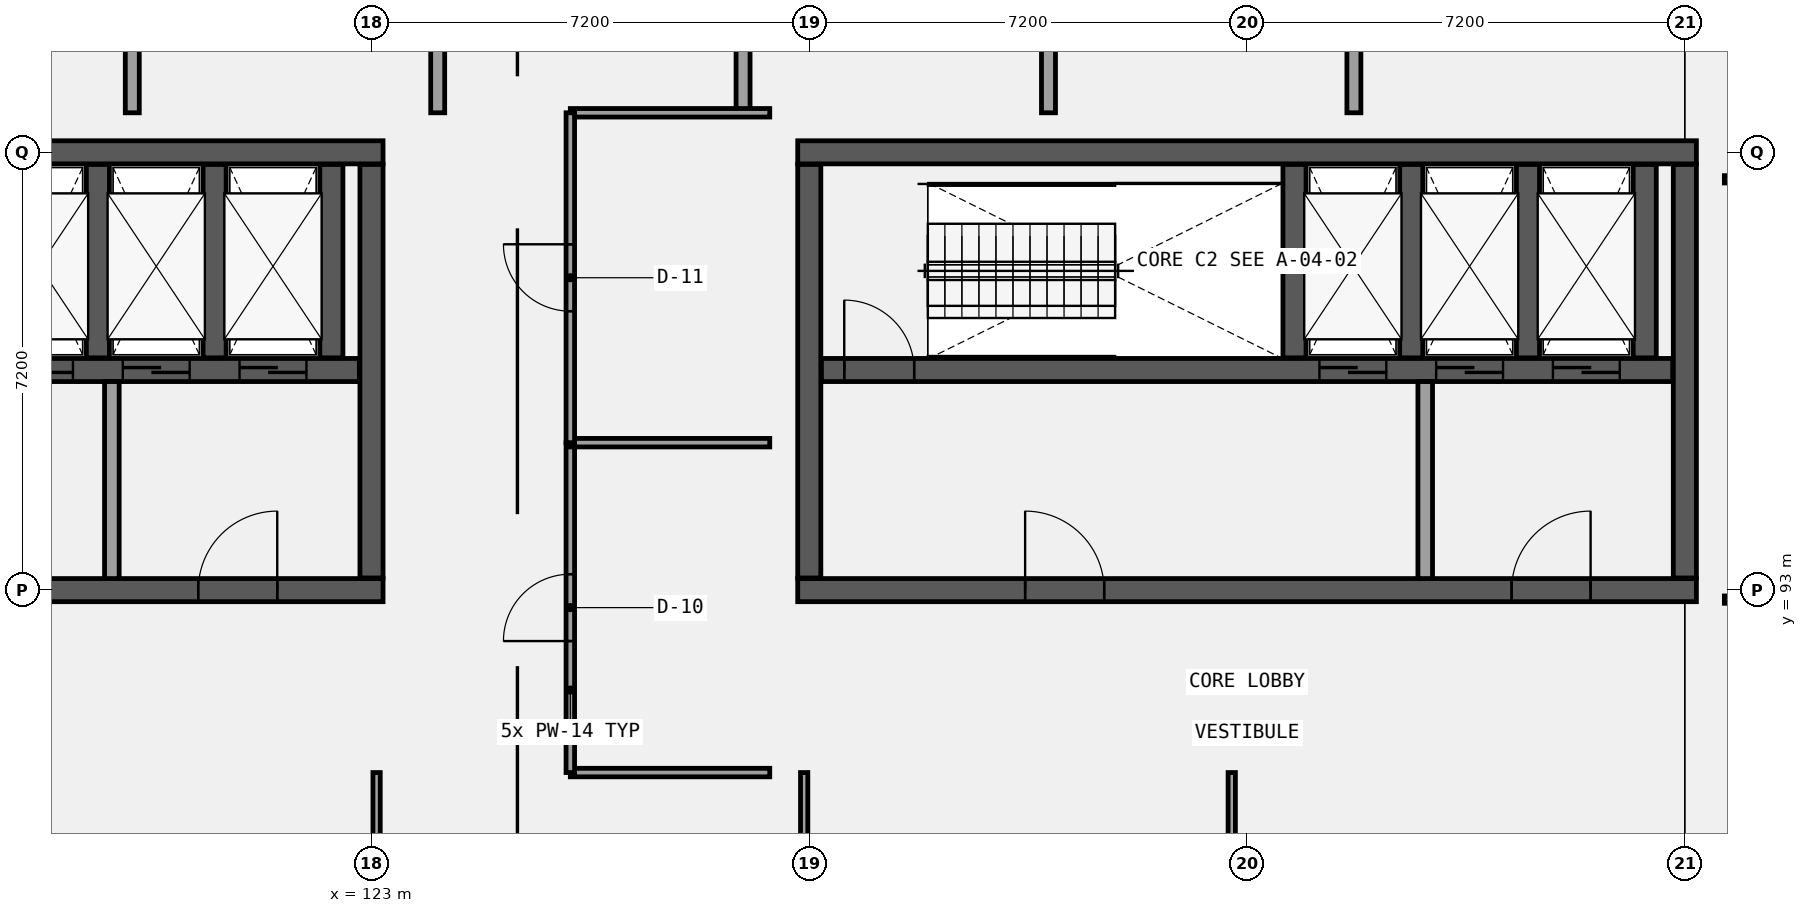
"""IFC4 building model, lengths in metres.
Left out: names, types, materials, properties, quantities, classifications, styles, units other than length and angle.
Written with IfcOpenShell. Run it as: python <this file> out.ifc"""

import sys

from ifc_helpers import new_model, si_unit, direction, frame, frame_2d, origin, place, context, subcontext, project, spatial, rectangle, extrude, element, fill, save


model = new_model("IFC4")
c1 = context("Model", 3, precision=1e-05, world=origin(), true_north=direction((0.0, 1.0)))
c2 = subcontext(c1, "Body", "Model", "MODEL_VIEW")
j1 = project(units=[si_unit("LENGTHUNIT", "METRE"), si_unit("PLANEANGLEUNIT", "RADIAN")], contexts=[c1])
p1 = place(None, origin())
s1 = spatial("IfcSite", under=j1, at=p1, CompositionType="ELEMENT")
p2 = place(p1, origin())
s2 = spatial("IfcBuilding", under=s1, at=p2, CompositionType="ELEMENT")
p3 = place(p2, frame((0.0, 0.0, 13.8)))
s3 = spatial("IfcBuildingStorey", under=s2, at=p3, CompositionType="ELEMENT", Elevation=13.8)
p4 = place(p3, frame((108.41, 100.2, 0.0), z_axis=(0.0, 0.0, 1.0), x_axis=(1.0, 0.0, 0.0)))
e1 = element("IfcWall", 1, at=p4, inside=s3, PredefinedType="SHEAR", context=c2, shape_type="SweptSolid", body=[
    extrude(rectangle(XDim=14.78, YDim=0.38, at=frame_2d((7.39, 0.0))), origin(), (0.0, 0.0, 1.0), 4.2),
])
p5 = place(p3, frame((108.41, 93.0, 0.0), z_axis=(0.0, 0.0, 1.0), x_axis=(1.0, 0.0, 0.0)))
e2 = element("IfcWall", 2, at=p5, inside=s3, PredefinedType="SHEAR", context=c2, shape_type="SweptSolid", body=[
    extrude(rectangle(XDim=14.78, YDim=0.38, at=frame_2d((7.39, 0.0))), origin(), (0.0, 0.0, 1.0), 4.2),
])
p6 = place(p5, frame((3.74, 0.0, 0.0)))
e3 = element("IfcOpeningElement", 3, at=p6, cuts=e2, PredefinedType="OPENING", context=c2, shape_type="SweptSolid", body=[
    extrude(rectangle(XDim=1.3, YDim=2.2, at=frame_2d((0.65, 1.1))), frame((0.0, 0.2, 0.0), z_axis=(0.0, -1.0, 0.0), x_axis=(1.0, 0.0, 0.0)), (0.0, 0.0, 1.0), 0.4),
])
p7 = place(p5, frame((11.74, 0.0, 0.0)))
e4 = element("IfcOpeningElement", 4, at=p7, cuts=e2, PredefinedType="OPENING", context=c2, shape_type="SweptSolid", body=[
    extrude(rectangle(XDim=1.3, YDim=2.2, at=frame_2d((0.65, 1.1))), frame((0.0, 0.2, 0.0), z_axis=(0.0, -1.0, 0.0), x_axis=(1.0, 0.0, 0.0)), (0.0, 0.0, 1.0), 0.4),
])
p8 = place(p3, frame((123.0, 93.2, 0.0), z_axis=(0.0, 0.0, 1.0), x_axis=(0.0, 1.0, 0.0)))
e5 = element("IfcWall", 5, at=p8, inside=s3, PredefinedType="SHEAR", context=c2, shape_type="SweptSolid", body=[
    extrude(rectangle(XDim=6.8, YDim=0.38, at=frame_2d((3.4, 0.0))), origin(), (0.0, 0.0, 1.0), 4.2),
])
p9 = place(p3, frame((108.8, 96.62, 0.0), z_axis=(0.0, 0.0, 1.0), x_axis=(1.0, 0.0, 0.0)))
e6 = element("IfcWall", 6, at=p9, inside=s3, PredefinedType="SHEAR", context=c2, shape_type="SweptSolid", body=[
    extrude(rectangle(XDim=14.0, YDim=0.38, at=frame_2d((7.0, 0.0))), origin(), (0.0, 0.0, 1.0), 4.2),
])
p10 = place(p9, frame((8.19, 0.0, 0.0)))
e7 = element("IfcOpeningElement", 7, at=p10, cuts=e6, PredefinedType="OPENING", context=c2, shape_type="SweptSolid", body=[
    extrude(rectangle(XDim=1.1, YDim=2.15, at=frame_2d((0.55, 1.075))), frame((0.0, 0.2, 0.0), z_axis=(0.0, -1.0, 0.0), x_axis=(1.0, 0.0, 0.0)), (0.0, 0.0, 1.0), 0.4),
])
p11 = place(p9, frame((10.11, 0.0, 0.0)))
e8 = element("IfcOpeningElement", 8, at=p11, cuts=e6, PredefinedType="OPENING", context=c2, shape_type="SweptSolid", body=[
    extrude(rectangle(XDim=1.1, YDim=2.15, at=frame_2d((0.55, 1.075))), frame((0.0, 0.2, 0.0), z_axis=(0.0, -1.0, 0.0), x_axis=(1.0, 0.0, 0.0)), (0.0, 0.0, 1.0), 0.4),
])
p12 = place(p9, frame((12.03, 0.0, 0.0)))
e9 = element("IfcOpeningElement", 9, at=p12, cuts=e6, PredefinedType="OPENING", context=c2, shape_type="SweptSolid", body=[
    extrude(rectangle(XDim=1.1, YDim=2.15, at=frame_2d((0.55, 1.075))), frame((0.0, 0.2, 0.0), z_axis=(0.0, -1.0, 0.0), x_axis=(1.0, 0.0, 0.0)), (0.0, 0.0, 1.0), 0.4),
])
p13 = place(p9, frame((0.375, 0.0, 0.0)))
e10 = element("IfcOpeningElement", 10, at=p13, cuts=e6, PredefinedType="OPENING", context=c2, shape_type="SweptSolid", body=[
    extrude(rectangle(XDim=1.15, YDim=2.15, at=frame_2d((0.575, 1.075))), frame((0.0, 0.2, 0.0), z_axis=(0.0, -1.0, 0.0), x_axis=(1.0, 0.0, 0.0)), (0.0, 0.0, 1.0), 0.4),
])
for number, where, z_axis, x_axis in (
    (11, (118.5, 96.82, 0.0), (0.0, 0.0, 1.0), (0.0, 1.0, 0.0)),
    (12, (120.42, 96.82, 0.0), (0.0, 0.0, 1.0), (0.0, 1.0, 0.0)),
    (13, (122.34, 96.82, 0.0), (0.0, 0.0, 1.0), (0.0, 1.0, 0.0)),
):
    element("IfcWall", number, at=place(p3, frame(where, z_axis=z_axis, x_axis=x_axis)), inside=s3, PredefinedType="SHEAR", context=c2, shape_type="SweptSolid", body=[
        extrude(rectangle(XDim=3.18, YDim=0.38, at=frame_2d((1.59, 0.0))), origin(), (0.0, 0.0, 1.0), 4.2),
    ])
p14 = place(p3, frame((130.01, 100.2, 0.0), z_axis=(0.0, 0.0, 1.0), x_axis=(1.0, 0.0, 0.0)))
e14 = element("IfcWall", 14, at=p14, inside=s3, PredefinedType="SHEAR", context=c2, shape_type="SweptSolid", body=[
    extrude(rectangle(XDim=14.78, YDim=0.38, at=frame_2d((7.39, 0.0))), origin(), (0.0, 0.0, 1.0), 4.2),
])
p15 = place(p3, frame((130.01, 93.0, 0.0), z_axis=(0.0, 0.0, 1.0), x_axis=(1.0, 0.0, 0.0)))
e15 = element("IfcWall", 15, at=p15, inside=s3, PredefinedType="SHEAR", context=c2, shape_type="SweptSolid", body=[
    extrude(rectangle(XDim=14.78, YDim=0.38, at=frame_2d((7.39, 0.0))), origin(), (0.0, 0.0, 1.0), 4.2),
])
p16 = place(p15, frame((3.74, 0.0, 0.0)))
e16 = element("IfcOpeningElement", 16, at=p16, cuts=e15, PredefinedType="OPENING", context=c2, shape_type="SweptSolid", body=[
    extrude(rectangle(XDim=1.3, YDim=2.2, at=frame_2d((0.65, 1.1))), frame((0.0, 0.2, 0.0), z_axis=(0.0, -1.0, 0.0), x_axis=(1.0, 0.0, 0.0)), (0.0, 0.0, 1.0), 0.4),
])
p17 = place(p15, frame((11.74, 0.0, 0.0)))
e17 = element("IfcOpeningElement", 17, at=p17, cuts=e15, PredefinedType="OPENING", context=c2, shape_type="SweptSolid", body=[
    extrude(rectangle(XDim=1.3, YDim=2.2, at=frame_2d((0.65, 1.1))), frame((0.0, 0.2, 0.0), z_axis=(0.0, -1.0, 0.0), x_axis=(1.0, 0.0, 0.0)), (0.0, 0.0, 1.0), 0.4),
])
for number, where, z_axis, x_axis in (
    (18, (130.2, 93.2, 0.0), (0.0, 0.0, 1.0), (0.0, 1.0, 0.0)),
    (19, (144.6, 93.2, 0.0), (0.0, 0.0, 1.0), (0.0, 1.0, 0.0)),
):
    element("IfcWall", number, at=place(p3, frame(where, z_axis=z_axis, x_axis=x_axis)), inside=s3, PredefinedType="SHEAR", context=c2, shape_type="SweptSolid", body=[
        extrude(rectangle(XDim=6.8, YDim=0.38, at=frame_2d((3.4, 0.0))), origin(), (0.0, 0.0, 1.0), 4.2),
    ])
p18 = place(p3, frame((130.4, 96.62, 0.0), z_axis=(0.0, 0.0, 1.0), x_axis=(1.0, 0.0, 0.0)))
e20 = element("IfcWall", 20, at=p18, inside=s3, PredefinedType="SHEAR", context=c2, shape_type="SweptSolid", body=[
    extrude(rectangle(XDim=14.0, YDim=0.38, at=frame_2d((7.0, 0.0))), origin(), (0.0, 0.0, 1.0), 4.2),
])
p19 = place(p18, frame((8.19, 0.0, 0.0)))
e21 = element("IfcOpeningElement", 21, at=p19, cuts=e20, PredefinedType="OPENING", context=c2, shape_type="SweptSolid", body=[
    extrude(rectangle(XDim=1.1, YDim=2.15, at=frame_2d((0.55, 1.075))), frame((0.0, 0.2, 0.0), z_axis=(0.0, -1.0, 0.0), x_axis=(1.0, 0.0, 0.0)), (0.0, 0.0, 1.0), 0.4),
])
p20 = place(p18, frame((10.11, 0.0, 0.0)))
e22 = element("IfcOpeningElement", 22, at=p20, cuts=e20, PredefinedType="OPENING", context=c2, shape_type="SweptSolid", body=[
    extrude(rectangle(XDim=1.1, YDim=2.15, at=frame_2d((0.55, 1.075))), frame((0.0, 0.2, 0.0), z_axis=(0.0, -1.0, 0.0), x_axis=(1.0, 0.0, 0.0)), (0.0, 0.0, 1.0), 0.4),
])
p21 = place(p18, frame((12.03, 0.0, 0.0)))
e23 = element("IfcOpeningElement", 23, at=p21, cuts=e20, PredefinedType="OPENING", context=c2, shape_type="SweptSolid", body=[
    extrude(rectangle(XDim=1.1, YDim=2.15, at=frame_2d((0.55, 1.075))), frame((0.0, 0.2, 0.0), z_axis=(0.0, -1.0, 0.0), x_axis=(1.0, 0.0, 0.0)), (0.0, 0.0, 1.0), 0.4),
])
p22 = place(p18, frame((0.375, 0.0, 0.0)))
e24 = element("IfcOpeningElement", 24, at=p22, cuts=e20, PredefinedType="OPENING", context=c2, shape_type="SweptSolid", body=[
    extrude(rectangle(XDim=1.15, YDim=2.15, at=frame_2d((0.575, 1.075))), frame((0.0, 0.2, 0.0), z_axis=(0.0, -1.0, 0.0), x_axis=(1.0, 0.0, 0.0)), (0.0, 0.0, 1.0), 0.4),
])
for number, where, z_axis, x_axis in (
    (25, (138.18, 96.82, 0.0), (0.0, 0.0, 1.0), (0.0, 1.0, 0.0)),
    (26, (140.1, 96.82, 0.0), (0.0, 0.0, 1.0), (0.0, 1.0, 0.0)),
    (27, (142.02, 96.82, 0.0), (0.0, 0.0, 1.0), (0.0, 1.0, 0.0)),
    (28, (143.94, 96.82, 0.0), (0.0, 0.0, 1.0), (0.0, 1.0, 0.0)),
):
    element("IfcWall", number, at=place(p3, frame(where, z_axis=z_axis, x_axis=x_axis)), inside=s3, PredefinedType="SHEAR", context=c2, shape_type="SweptSolid", body=[
        extrude(rectangle(XDim=3.18, YDim=0.38, at=frame_2d((1.59, 0.0))), origin(), (0.0, 0.0, 1.0), 4.2),
    ])
for number, where, z_axis, x_axis in (
    (29, (118.73, 93.19, 0.0), (0.0, 0.0, 1.0), (0.0, 1.0, 0.0)),
    (30, (140.33, 93.19, 0.0), (0.0, 0.0, 1.0), (0.0, 1.0, 0.0)),
):
    element("IfcWall", number, at=place(p3, frame(where, z_axis=z_axis, x_axis=x_axis)), inside=s3, PredefinedType="SOLIDWALL", context=c2, shape_type="SweptSolid", body=[
        extrude(rectangle(XDim=3.24, YDim=0.24, at=frame_2d((1.62, 0.0))), origin(), (0.0, 0.0, 1.0), 3.91),
    ])
for number, where, z_axis, x_axis in (
    (31, (119.066, 100.85, 0.0), (0.0, 0.0, 1.0), (0.0, 1.0, 0.0)),
    (32, (124.089, 100.85, 0.0), (0.0, 0.0, 1.0), (0.0, 1.0, 0.0)),
    (33, (129.111, 100.85, 0.0), (0.0, 0.0, 1.0), (0.0, 1.0, 0.0)),
    (34, (134.134, 100.85, 0.0), (0.0, 0.0, 1.0), (0.0, 1.0, 0.0)),
    (35, (139.157, 100.85, 0.0), (0.0, 0.0, 1.0), (0.0, 1.0, 0.0)),
):
    element("IfcWall", number, at=place(p3, frame(where, z_axis=z_axis, x_axis=x_axis)), inside=s3, PredefinedType="PARTITIONING", context=c2, shape_type="SweptSolid", body=[
        extrude(rectangle(XDim=7.29, YDim=0.23, at=frame_2d((3.645, 0.0))), origin(), (0.0, 0.0, 1.0), 3.94),
    ])
p23 = place(p3, frame((123.084, 81.64, 0.0), z_axis=(0.0, 0.0, 1.0), x_axis=(0.0, 1.0, 0.0)))
e36 = element("IfcWall", 36, at=p23, inside=s3, PredefinedType="PARTITIONING", context=c2, shape_type="SweptSolid", body=[
    extrude(rectangle(XDim=8.36, YDim=0.12, at=frame_2d((4.18, 0.0))), origin(), (0.0, 0.0, 1.0), 3.34),
])
p24 = place(p3, frame((130.116, 81.64, 0.0), z_axis=(0.0, 0.0, 1.0), x_axis=(0.0, 1.0, 0.0)))
e37 = element("IfcWall", 37, at=p24, inside=s3, PredefinedType="PARTITIONING", context=c2, shape_type="SweptSolid", body=[
    extrude(rectangle(XDim=8.36, YDim=0.12, at=frame_2d((4.18, 0.0))), origin(), (0.0, 0.0, 1.0), 3.29),
])
p25 = place(p3, frame((137.148, 81.64, 0.0), z_axis=(0.0, 0.0, 1.0), x_axis=(0.0, 1.0, 0.0)))
e38 = element("IfcWall", 38, at=p25, inside=s3, PredefinedType="PARTITIONING", context=c2, shape_type="SweptSolid", body=[
    extrude(rectangle(XDim=8.36, YDim=0.12, at=frame_2d((4.18, 0.0))), origin(), (0.0, 0.0, 1.0), 3.19),
])
for number, where, z_axis, x_axis in (
    (39, (126.27, 90.0, 0.0), (0.0, 0.0, 1.0), (1.0, 0.0, 0.0)),
    (40, (126.27, 100.85, 0.0), (0.0, 0.0, 1.0), (1.0, 0.0, 0.0)),
):
    element("IfcWall", number, at=place(p3, frame(where, z_axis=z_axis, x_axis=x_axis)), inside=s3, PredefinedType="PARTITIONING", context=c2, shape_type="SweptSolid", body=[
        extrude(rectangle(XDim=3.28, YDim=0.14, at=frame_2d((1.64, 0.0))), origin(), (0.0, 0.0, 1.0), 3.94),
    ])
p26 = place(p3, frame((126.27, 90.0, 0.0), z_axis=(0.0, 0.0, 1.0), x_axis=(0.0, 1.0, 0.0)))
e41 = element("IfcWall", 41, at=p26, inside=s3, PredefinedType="PARTITIONING", context=c2, shape_type="SweptSolid", body=[
    extrude(rectangle(XDim=5.425, YDim=0.14, at=frame_2d((2.712, 0.0))), origin(), (0.0, 0.0, 1.0), 3.94),
])
p27 = place(p26, frame((2.163, 0.0, 0.0)))
e42 = element("IfcOpeningElement", 42, at=p27, cuts=e41, PredefinedType="OPENING", context=c2, shape_type="SweptSolid", body=[
    extrude(rectangle(XDim=1.1, YDim=2.1, at=frame_2d((0.55, 1.05))), frame((0.0, 0.08, 0.0), z_axis=(0.0, -1.0, 0.0), x_axis=(1.0, 0.0, 0.0)), (0.0, 0.0, 1.0), 0.16),
])
p28 = place(p3, frame((126.27, 95.425, 0.0), z_axis=(0.0, 0.0, 1.0), x_axis=(1.0, 0.0, 0.0)))
e43 = element("IfcWall", 43, at=p28, inside=s3, PredefinedType="PARTITIONING", context=c2, shape_type="SweptSolid", body=[
    extrude(rectangle(XDim=3.28, YDim=0.14, at=frame_2d((1.64, 0.0))), origin(), (0.0, 0.0, 1.0), 3.94),
])
p29 = place(p3, frame((126.27, 95.425, 0.0), z_axis=(0.0, 0.0, 1.0), x_axis=(0.0, 1.0, 0.0)))
e44 = element("IfcWall", 44, at=p29, inside=s3, PredefinedType="PARTITIONING", context=c2, shape_type="SweptSolid", body=[
    extrude(rectangle(XDim=5.425, YDim=0.14, at=frame_2d((2.712, 0.0))), origin(), (0.0, 0.0, 1.0), 3.94),
])
p30 = place(p29, frame((2.163, 0.0, 0.0)))
e45 = element("IfcOpeningElement", 45, at=p30, cuts=e44, PredefinedType="OPENING", context=c2, shape_type="SweptSolid", body=[
    extrude(rectangle(XDim=1.1, YDim=2.22, at=frame_2d((0.55, 1.11))), frame((0.0, 0.08, 0.0), z_axis=(0.0, -1.0, 0.0), x_axis=(1.0, 0.0, 0.0)), (0.0, 0.0, 1.0), 0.16),
])
p31 = place(p3, frame((145.25, 92.844, 0.0), z_axis=(0.0, 0.0, 1.0), x_axis=(1.0, 0.0, 0.0)))
e46 = element("IfcWall", 46, at=p31, inside=s3, PredefinedType="PARTITIONING", context=c2, shape_type="SweptSolid", body=[
    extrude(rectangle(XDim=9.095, YDim=0.12, at=frame_2d((4.547, 0.0))), origin(), (0.0, 0.0, 1.0), 3.19),
])
p32 = place(p3, frame((145.25, 99.756, 0.0), z_axis=(0.0, 0.0, 1.0), x_axis=(1.0, 0.0, 0.0)))
e47 = element("IfcWall", 47, at=p32, inside=s3, PredefinedType="PARTITIONING", context=c2, shape_type="SweptSolid", body=[
    extrude(rectangle(XDim=9.095, YDim=0.12, at=frame_2d((4.547, 0.0))), origin(), (0.0, 0.0, 1.0), 3.94),
])
p33 = place(p10, frame((1.1, 0.0, 0.0), z_axis=(0.0, 0.0, 1.0), x_axis=(-1.0, 0.0, 0.0)))
e48 = element("IfcDoor", 48, at=p33, inside=s3, OperationType="DOUBLE_DOOR_SLIDING", PredefinedType="DOOR", context=c2, shape_type="SweptSolid", body=[
    extrude(rectangle(XDim=1.1, YDim=2.15, at=frame_2d((0.55, 1.075))), frame((0.0, 0.025, 0.0), z_axis=(0.0, -1.0, 0.0), x_axis=(1.0, 0.0, 0.0)), (0.0, 0.0, 1.0), 0.05),
])
fill(e7, e48)
p34 = place(p11, frame((1.1, 0.0, 0.0), z_axis=(0.0, 0.0, 1.0), x_axis=(-1.0, 0.0, 0.0)))
e49 = element("IfcDoor", 49, at=p34, inside=s3, OperationType="DOUBLE_DOOR_SLIDING", PredefinedType="DOOR", context=c2, shape_type="SweptSolid", body=[
    extrude(rectangle(XDim=1.1, YDim=2.15, at=frame_2d((0.55, 1.075))), frame((0.0, 0.025, 0.0), z_axis=(0.0, -1.0, 0.0), x_axis=(1.0, 0.0, 0.0)), (0.0, 0.0, 1.0), 0.05),
])
fill(e8, e49)
p35 = place(p12, frame((1.1, 0.0, 0.0), z_axis=(0.0, 0.0, 1.0), x_axis=(-1.0, 0.0, 0.0)))
e50 = element("IfcDoor", 50, at=p35, inside=s3, OperationType="DOUBLE_DOOR_SLIDING", PredefinedType="DOOR", context=c2, shape_type="SweptSolid", body=[
    extrude(rectangle(XDim=1.1, YDim=2.15, at=frame_2d((0.55, 1.075))), frame((0.0, 0.025, 0.0), z_axis=(0.0, -1.0, 0.0), x_axis=(1.0, 0.0, 0.0)), (0.0, 0.0, 1.0), 0.05),
])
fill(e9, e50)
p36 = place(p7, frame((1.3, 0.0, 0.0), z_axis=(0.0, 0.0, 1.0), x_axis=(-1.0, 0.0, 0.0)))
e51 = element("IfcDoor", 51, at=p36, inside=s3, OperationType="SINGLE_SWING_RIGHT", PredefinedType="DOOR", context=c2, shape_type="SweptSolid", body=[
    extrude(rectangle(XDim=1.3, YDim=2.2, at=frame_2d((0.65, 1.1))), frame((0.0, 0.025, 0.0), z_axis=(0.0, -1.0, 0.0), x_axis=(1.0, 0.0, 0.0)), (0.0, 0.0, 1.0), 0.05),
])
fill(e4, e51)
p37 = place(p19, frame((1.1, 0.0, 0.0), z_axis=(0.0, 0.0, 1.0), x_axis=(-1.0, 0.0, 0.0)))
e52 = element("IfcDoor", 52, at=p37, inside=s3, OperationType="DOUBLE_DOOR_SLIDING", PredefinedType="DOOR", context=c2, shape_type="SweptSolid", body=[
    extrude(rectangle(XDim=1.1, YDim=2.15, at=frame_2d((0.55, 1.075))), frame((0.0, 0.025, 0.0), z_axis=(0.0, -1.0, 0.0), x_axis=(1.0, 0.0, 0.0)), (0.0, 0.0, 1.0), 0.05),
])
fill(e21, e52)
p38 = place(p20, frame((1.1, 0.0, 0.0), z_axis=(0.0, 0.0, 1.0), x_axis=(-1.0, 0.0, 0.0)))
e53 = element("IfcDoor", 53, at=p38, inside=s3, OperationType="DOUBLE_DOOR_SLIDING", PredefinedType="DOOR", context=c2, shape_type="SweptSolid", body=[
    extrude(rectangle(XDim=1.1, YDim=2.15, at=frame_2d((0.55, 1.075))), frame((0.0, 0.025, 0.0), z_axis=(0.0, -1.0, 0.0), x_axis=(1.0, 0.0, 0.0)), (0.0, 0.0, 1.0), 0.05),
])
fill(e22, e53)
p39 = place(p21, frame((1.1, 0.0, 0.0), z_axis=(0.0, 0.0, 1.0), x_axis=(-1.0, 0.0, 0.0)))
e54 = element("IfcDoor", 54, at=p39, inside=s3, OperationType="DOUBLE_DOOR_SLIDING", PredefinedType="DOOR", context=c2, shape_type="SweptSolid", body=[
    extrude(rectangle(XDim=1.1, YDim=2.15, at=frame_2d((0.55, 1.075))), frame((0.0, 0.025, 0.0), z_axis=(0.0, -1.0, 0.0), x_axis=(1.0, 0.0, 0.0)), (0.0, 0.0, 1.0), 0.05),
])
fill(e23, e54)
p40 = place(p22, origin())
e55 = element("IfcDoor", 55, at=p40, inside=s3, OperationType="SINGLE_SWING_LEFT", PredefinedType="DOOR", context=c2, shape_type="SweptSolid", body=[
    extrude(rectangle(XDim=1.15, YDim=2.15, at=frame_2d((0.575, 1.075))), frame((0.0, 0.025, 0.0), z_axis=(0.0, -1.0, 0.0), x_axis=(1.0, 0.0, 0.0)), (0.0, 0.0, 1.0), 0.05),
])
fill(e24, e55)
p41 = place(p16, frame((1.3, 0.0, 0.0), z_axis=(0.0, 0.0, 1.0), x_axis=(-1.0, 0.0, 0.0)))
e56 = element("IfcDoor", 56, at=p41, inside=s3, OperationType="SINGLE_SWING_LEFT", PredefinedType="DOOR", context=c2, shape_type="SweptSolid", body=[
    extrude(rectangle(XDim=1.3, YDim=2.2, at=frame_2d((0.65, 1.1))), frame((0.0, 0.025, 0.0), z_axis=(0.0, -1.0, 0.0), x_axis=(1.0, 0.0, 0.0)), (0.0, 0.0, 1.0), 0.05),
])
fill(e16, e56)
p42 = place(p17, frame((1.3, 0.0, 0.0), z_axis=(0.0, 0.0, 1.0), x_axis=(-1.0, 0.0, 0.0)))
e57 = element("IfcDoor", 57, at=p42, inside=s3, OperationType="SINGLE_SWING_RIGHT", PredefinedType="DOOR", context=c2, shape_type="SweptSolid", body=[
    extrude(rectangle(XDim=1.3, YDim=2.2, at=frame_2d((0.65, 1.1))), frame((0.0, 0.025, 0.0), z_axis=(0.0, -1.0, 0.0), x_axis=(1.0, 0.0, 0.0)), (0.0, 0.0, 1.0), 0.05),
])
fill(e17, e57)
p43 = place(p27, origin())
e58 = element("IfcDoor", 58, at=p43, inside=s3, OperationType="SINGLE_SWING_LEFT", PredefinedType="DOOR", context=c2, shape_type="SweptSolid", body=[
    extrude(rectangle(XDim=1.1, YDim=2.1, at=frame_2d((0.55, 1.05))), frame((0.0, 0.025, 0.0), z_axis=(0.0, -1.0, 0.0), x_axis=(1.0, 0.0, 0.0)), (0.0, 0.0, 1.0), 0.05),
])
fill(e42, e58)
p44 = place(p30, origin())
e59 = element("IfcDoor", 59, at=p44, inside=s3, OperationType="SINGLE_SWING_RIGHT", PredefinedType="DOOR", context=c2, shape_type="SweptSolid", body=[
    extrude(rectangle(XDim=1.1, YDim=2.22, at=frame_2d((0.55, 1.11))), frame((0.0, 0.025, 0.0), z_axis=(0.0, -1.0, 0.0), x_axis=(1.0, 0.0, 0.0)), (0.0, 0.0, 1.0), 0.05),
])
fill(e45, e59)
save(model, sys.argv[1])
